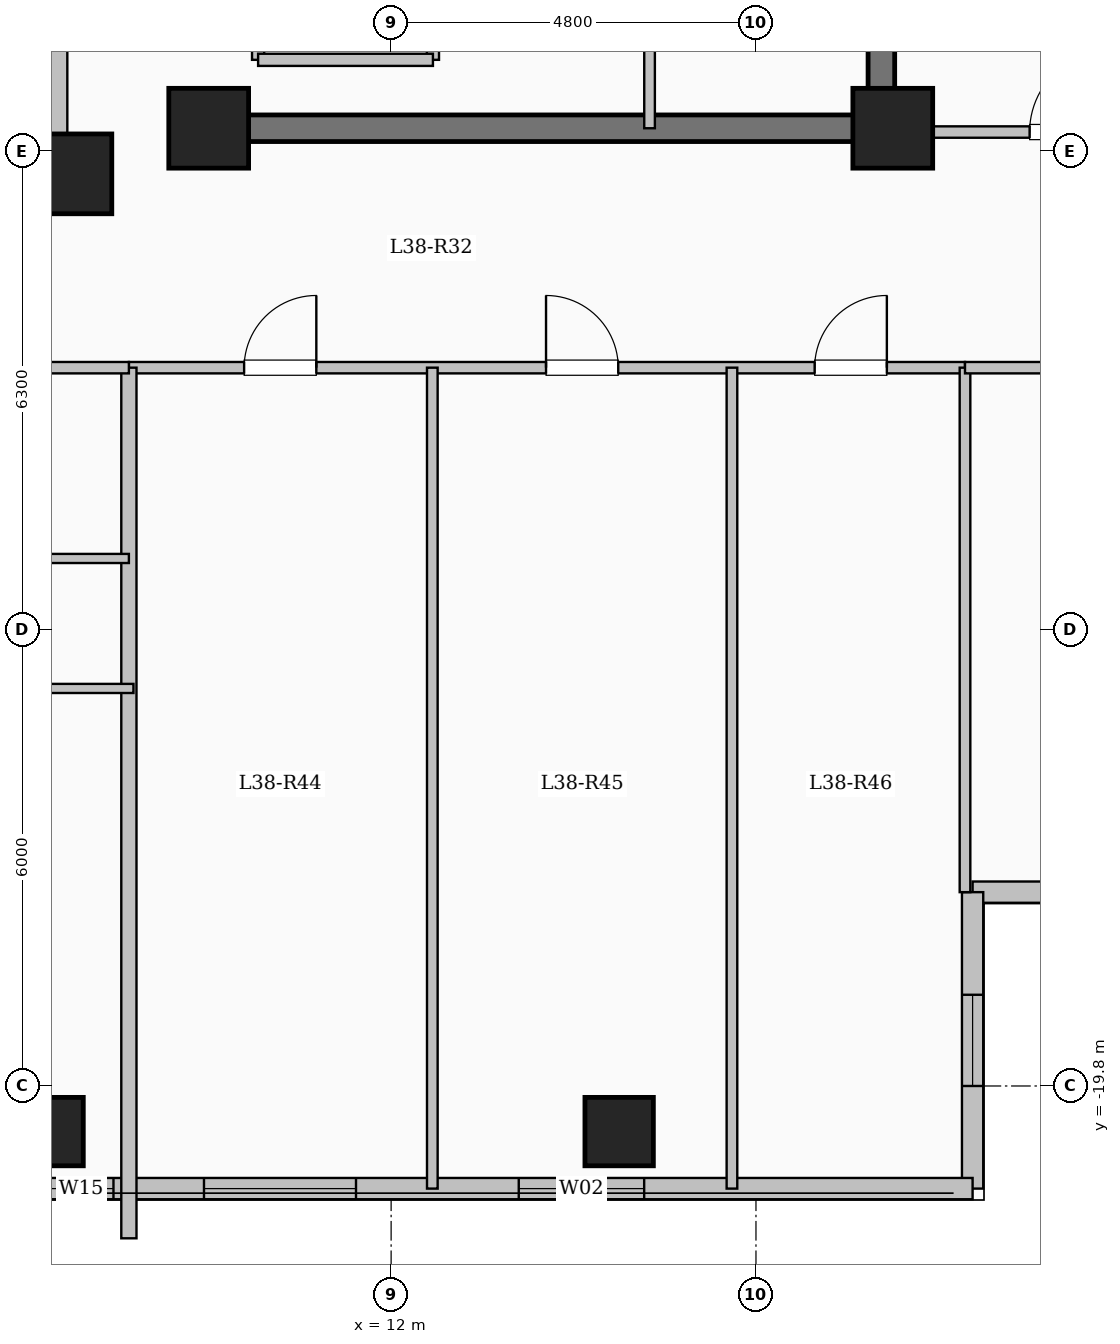
"""IFC4 building model, lengths in metres.
Left out: names, types, materials, properties, quantities, classifications, styles, units other than length and angle.
Written with IfcOpenShell. Run it as: python <this file> out.ifc"""

import sys

from ifc_helpers import new_model, si_unit, direction, frame, frame_2d, origin, origin_2d, place, context, subcontext, project, spatial, rectangle, extrude, element, fill, save


model = new_model("IFC4")
c1 = context("Model", 3, precision=1e-05, world=origin(), true_north=direction((0.0, 1.0)))
c2 = subcontext(c1, "Body", "Model", "MODEL_VIEW")
j1 = project(units=[si_unit("LENGTHUNIT", "METRE"), si_unit("PLANEANGLEUNIT", "RADIAN")], contexts=[c1])
p1 = place(None, origin())
s1 = spatial("IfcSite", under=j1, at=p1, CompositionType="ELEMENT")
p2 = place(p1, origin())
s2 = spatial("IfcBuilding", under=s1, at=p2, CompositionType="ELEMENT")
p3 = place(p2, frame((0.0, 0.0, 142.65)))
s3 = spatial("IfcBuildingStorey", under=s2, at=p3, CompositionType="ELEMENT", Elevation=142.65)
for number, where, z_axis, x_axis in (
    (1, (7.8, -7.8, 0.0), (0.0, 0.0, 1.0), (1.0, 0.0, 0.0)),
    (2, (9.6, -7.2, 0.0), (0.0, 0.0, 1.0), (1.0, 0.0, 0.0)),
    (3, (18.6, -7.2, 0.0), (0.0, 0.0, 1.0), (1.0, 0.0, 0.0)),
):
    element("IfcColumn", number, at=place(p3, frame(where, z_axis=z_axis, x_axis=x_axis)), inside=s3, PredefinedType="COLUMN", context=c2, shape_type="SweptSolid", body=[
        extrude(rectangle(XDim=1.05, YDim=1.05, at=origin_2d()), origin(), (0.0, 0.0, 1.0), 3.35),
    ])
for number, where, z_axis, x_axis in (
    (4, (7.5, -20.4, 0.0), (0.0, 0.0, 1.0), (1.0, 0.0, 0.0)),
    (5, (15.0, -20.4, 0.0), (0.0, 0.0, 1.0), (1.0, 0.0, 0.0)),
):
    element("IfcColumn", number, at=place(p3, frame(where, z_axis=z_axis, x_axis=x_axis)), inside=s3, PredefinedType="COLUMN", context=c2, shape_type="SweptSolid", body=[
        extrude(rectangle(XDim=0.9, YDim=0.9, at=origin_2d()), origin(), (0.0, 0.0, 1.0), 3.35),
    ])
p4 = place(p3, frame((-7.62, -7.62, 0.0), z_axis=(0.0, 0.0, 1.0), x_axis=(1.0, 0.0, 0.0)))
e6 = element("IfcWall", 6, at=p4, inside=s3, PredefinedType="SOLIDWALL", context=c2, shape_type="SweptSolid", body=[
    extrude(rectangle(XDim=15.24, YDim=0.24, at=frame_2d((7.62, 0.0))), origin(), (0.0, 0.0, 1.0), 3.1),
])
p5 = place(p4, frame((6.92, 0.0, 0.95)))
e7 = element("IfcOpeningElement", 7, at=p5, cuts=e6, PredefinedType="OPENING", context=c2, shape_type="SweptSolid", body=[
    extrude(rectangle(XDim=1.4, YDim=1.5, at=frame_2d((0.7, 0.75))), frame((0.0, 0.13, 0.0), z_axis=(0.0, -1.0, 0.0), x_axis=(1.0, 0.0, 0.0)), (0.0, 0.0, 1.0), 0.26),
])
p6 = place(p3, frame((7.62, -7.62, 0.0), z_axis=(0.0, 0.0, 1.0), x_axis=(0.0, 1.0, 0.0)))
e8 = element("IfcWall", 8, at=p6, inside=s3, PredefinedType="SOLIDWALL", context=c2, shape_type="SweptSolid", body=[
    extrude(rectangle(XDim=15.24, YDim=0.24, at=frame_2d((7.62, 0.0))), origin(), (0.0, 0.0, 1.0), 3.1),
])
p7 = place(p6, frame((6.92, 0.0, 0.95)))
e9 = element("IfcOpeningElement", 9, at=p7, cuts=e8, PredefinedType="OPENING", context=c2, shape_type="SweptSolid", body=[
    extrude(rectangle(XDim=1.4, YDim=1.5, at=frame_2d((0.7, 0.75))), frame((0.0, 0.13, 0.0), z_axis=(0.0, -1.0, 0.0), x_axis=(1.0, 0.0, 0.0)), (0.0, 0.0, 1.0), 0.26),
])
p8 = place(p3, frame((25.05, -17.25, 0.0), z_axis=(0.0, 0.0, 1.0), x_axis=(-1.0, 0.0, 0.0)))
e10 = element("IfcWall", 10, at=p8, inside=s3, PredefinedType="SOLIDWALL", context=c2, shape_type="SweptSolid", body=[
    extrude(rectangle(XDim=5.4, YDim=0.28, at=frame_2d((2.7, 0.0))), origin(), (0.0, 0.0, 1.0), 3.1),
])
p9 = place(p8, frame((1.625, 0.0, 0.9)))
e11 = element("IfcOpeningElement", 11, at=p9, cuts=e10, PredefinedType="OPENING", context=c2, shape_type="SweptSolid", body=[
    extrude(rectangle(XDim=2.2, YDim=1.75, at=frame_2d((1.1, 0.875))), frame((0.0, 0.15, 0.0), z_axis=(0.0, -1.0, 0.0), x_axis=(1.0, 0.0, 0.0)), (0.0, 0.0, 1.0), 0.3),
])
p10 = place(p3, frame((19.65, -17.25, 0.0), z_axis=(0.0, 0.0, 1.0), x_axis=(0.0, -1.0, 0.0)))
e12 = element("IfcWall", 12, at=p10, inside=s3, PredefinedType="SOLIDWALL", context=c2, shape_type="SweptSolid", body=[
    extrude(rectangle(XDim=3.9, YDim=0.28, at=frame_2d((1.95, 0.0))), origin(), (0.0, 0.0, 1.0), 3.1),
])
p11 = place(p10, frame((1.35, 0.0, 0.95)))
e13 = element("IfcOpeningElement", 13, at=p11, cuts=e12, PredefinedType="OPENING", context=c2, shape_type="SweptSolid", body=[
    extrude(rectangle(XDim=1.2, YDim=1.5, at=frame_2d((0.6, 0.75))), frame((0.0, 0.15, 0.0), z_axis=(0.0, -1.0, 0.0), x_axis=(1.0, 0.0, 0.0)), (0.0, 0.0, 1.0), 0.3),
])
p12 = place(p3, frame((19.65, -21.15, 0.0), z_axis=(0.0, 0.0, 1.0), x_axis=(-1.0, 0.0, 0.0)))
e14 = element("IfcWall", 14, at=p12, inside=s3, PredefinedType="SOLIDWALL", context=c2, shape_type="SweptSolid", body=[
    extrude(rectangle(XDim=12.3, YDim=0.28, at=frame_2d((6.15, 0.0))), origin(), (0.0, 0.0, 1.0), 3.1),
])
p13 = place(p12, frame((4.321, 0.0, 0.9)))
e15 = element("IfcOpeningElement", 15, at=p13, cuts=e14, PredefinedType="OPENING", context=c2, shape_type="SweptSolid", body=[
    extrude(rectangle(XDim=1.65, YDim=1.6, at=frame_2d((0.825, 0.8))), frame((0.0, 0.15, 0.0), z_axis=(0.0, -1.0, 0.0), x_axis=(1.0, 0.0, 0.0)), (0.0, 0.0, 1.0), 0.3),
])
p14 = place(p12, frame((8.112, 0.0, 0.9)))
e16 = element("IfcOpeningElement", 16, at=p14, cuts=e14, PredefinedType="OPENING", context=c2, shape_type="SweptSolid", body=[
    extrude(rectangle(XDim=2.0, YDim=1.7, at=frame_2d((1.0, 0.85))), frame((0.0, 0.15, 0.0), z_axis=(0.0, -1.0, 0.0), x_axis=(1.0, 0.0, 0.0)), (0.0, 0.0, 1.0), 0.3),
])
p15 = place(p12, frame((11.303, 0.0, 0.95)))
e17 = element("IfcOpeningElement", 17, at=p15, cuts=e14, PredefinedType="OPENING", context=c2, shape_type="SweptSolid", body=[
    extrude(rectangle(XDim=0.85, YDim=1.5, at=frame_2d((0.425, 0.75))), frame((0.0, 0.15, 0.0), z_axis=(0.0, -1.0, 0.0), x_axis=(1.0, 0.0, 0.0)), (0.0, 0.0, 1.0), 0.3),
])
p16 = place(p3, frame((10.25, -6.3, 0.0), z_axis=(0.0, 0.0, 1.0), x_axis=(0.0, 1.0, 0.0)))
e18 = element("IfcWall", 18, at=p16, inside=s3, PredefinedType="SOLIDWALL", context=c2, shape_type="SweptSolid", body=[
    extrude(rectangle(XDim=2.6, YDim=0.16, at=frame_2d((1.3, 0.0))), origin(), (0.0, 0.0, 1.0), 3.1),
])
p17 = place(p16, frame((0.75, 0.0, 0.0)))
e19 = element("IfcOpeningElement", 19, at=p17, cuts=e18, PredefinedType="OPENING", context=c2, shape_type="SweptSolid", body=[
    extrude(rectangle(XDim=1.1, YDim=2.15, at=frame_2d((0.55, 1.075))), frame((0.0, 0.09, 0.0), z_axis=(0.0, -1.0, 0.0), x_axis=(1.0, 0.0, 0.0)), (0.0, 0.0, 1.0), 0.18),
])
p18 = place(p3, frame((12.55, -6.3, 0.0), z_axis=(0.0, 0.0, 1.0), x_axis=(0.0, 1.0, 0.0)))
e20 = element("IfcWall", 20, at=p18, inside=s3, PredefinedType="SOLIDWALL", context=c2, shape_type="SweptSolid", body=[
    extrude(rectangle(XDim=2.6, YDim=0.16, at=frame_2d((1.3, 0.0))), origin(), (0.0, 0.0, 1.0), 3.1),
])
p19 = place(p3, frame((10.25, -6.3, 0.0), z_axis=(0.0, 0.0, 1.0), x_axis=(1.0, 0.0, 0.0)))
e21 = element("IfcWall", 21, at=p19, inside=s3, PredefinedType="SOLIDWALL", context=c2, shape_type="SweptSolid", body=[
    extrude(rectangle(XDim=2.3, YDim=0.16, at=frame_2d((1.15, 0.0))), origin(), (0.0, 0.0, 1.0), 3.1),
])
p20 = place(p3, frame((18.45, -7.375, 0.0), z_axis=(0.0, 0.0, 1.0), x_axis=(0.0, 1.0, 0.0)))
e22 = element("IfcWall", 22, at=p20, inside=s3, PredefinedType="SHEAR", context=c2, shape_type="SweptSolid", body=[
    extrude(rectangle(XDim=14.05, YDim=0.35, at=frame_2d((7.025, 0.0))), origin(), (0.0, 0.0, 1.0), 3.35),
])
p21 = place(p3, frame((10.075, -7.2, 0.0), z_axis=(0.0, 0.0, 1.0), x_axis=(1.0, 0.0, 0.0)))
e23 = element("IfcWall", 23, at=p21, inside=s3, PredefinedType="SHEAR", context=c2, shape_type="SweptSolid", body=[
    extrude(rectangle(XDim=8.55, YDim=0.35, at=frame_2d((4.275, 0.0))), origin(), (0.0, 0.0, 1.0), 3.35),
])
p22 = place(p3, frame((15.4, -7.2, 0.0), z_axis=(0.0, 0.0, 1.0), x_axis=(0.0, 1.0, 0.0)))
e24 = element("IfcWall", 24, at=p22, inside=s3, PredefinedType="PARTITIONING", context=c2, shape_type="SweptSolid", body=[
    extrude(rectangle(XDim=10.45, YDim=0.14, at=frame_2d((5.225, 0.0))), origin(), (0.0, 0.0, 1.0), 3.1),
])
p23 = place(p22, frame((9.25, 0.0, 0.0)))
e25 = element("IfcOpeningElement", 25, at=p23, cuts=e24, PredefinedType="OPENING", context=c2, shape_type="SweptSolid", body=[
    extrude(rectangle(XDim=0.9, YDim=2.08, at=frame_2d((0.45, 1.04))), frame((0.0, 0.08, 0.0), z_axis=(0.0, -1.0, 0.0), x_axis=(1.0, 0.0, 0.0)), (0.0, 0.0, 1.0), 0.16),
])
p24 = place(p3, frame((8.55, -10.35, 0.0), z_axis=(0.0, 0.0, 1.0), x_axis=(1.0, 0.0, 0.0)))
e26 = element("IfcWall", 26, at=p24, inside=s3, PredefinedType="PARTITIONING", context=c2, shape_type="SweptSolid", body=[
    extrude(rectangle(XDim=11.0, YDim=0.15, at=frame_2d((5.5, 0.0))), origin(), (0.0, 0.0, 1.0), 3.1),
])
p25 = place(p24, frame((1.516, 0.0, 0.0)))
e27 = element("IfcOpeningElement", 27, at=p25, cuts=e26, PredefinedType="OPENING", context=c2, shape_type="SweptSolid", body=[
    extrude(rectangle(XDim=0.95, YDim=2.15, at=frame_2d((0.475, 1.075))), frame((0.0, 0.085, 0.0), z_axis=(0.0, -1.0, 0.0), x_axis=(1.0, 0.0, 0.0)), (0.0, 0.0, 1.0), 0.17),
])
p26 = place(p24, frame((5.488, 0.0, 0.0)))
e28 = element("IfcOpeningElement", 28, at=p26, cuts=e26, PredefinedType="OPENING", context=c2, shape_type="SweptSolid", body=[
    extrude(rectangle(XDim=0.95, YDim=2.15, at=frame_2d((0.475, 1.075))), frame((0.0, 0.085, 0.0), z_axis=(0.0, -1.0, 0.0), x_axis=(1.0, 0.0, 0.0)), (0.0, 0.0, 1.0), 0.17),
])
p27 = place(p24, frame((9.022, 0.0, 0.0)))
e29 = element("IfcOpeningElement", 29, at=p27, cuts=e26, PredefinedType="OPENING", context=c2, shape_type="SweptSolid", body=[
    extrude(rectangle(XDim=0.95, YDim=2.15, at=frame_2d((0.475, 1.075))), frame((0.0, 0.085, 0.0), z_axis=(0.0, -1.0, 0.0), x_axis=(1.0, 0.0, 0.0)), (0.0, 0.0, 1.0), 0.17),
])
for number, where, z_axis, x_axis in (
    (30, (12.542, -21.15, 0.0), (0.0, 0.0, 1.0), (0.0, 1.0, 0.0)),
    (31, (16.484, -21.15, 0.0), (0.0, 0.0, 1.0), (0.0, 1.0, 0.0)),
):
    element("IfcWall", number, at=place(p3, frame(where, z_axis=z_axis, x_axis=x_axis)), inside=s3, PredefinedType="PARTITIONING", context=c2, shape_type="SweptSolid", body=[
        extrude(rectangle(XDim=10.8, YDim=0.14, at=frame_2d((5.4, 0.0))), origin(), (0.0, 0.0, 1.0), 3.1),
    ])
p28 = place(p3, frame((8.55, -21.804, 0.0), z_axis=(0.0, 0.0, 1.0), x_axis=(0.0, 1.0, 0.0)))
e32 = element("IfcWall", 32, at=p28, inside=s3, PredefinedType="SOLIDWALL", context=c2, shape_type="SweptSolid", body=[
    extrude(rectangle(XDim=11.454, YDim=0.2, at=frame_2d((5.727, 0.0))), origin(), (0.0, 0.0, 1.0), 3.1),
])
p29 = place(p3, frame((-8.55, -10.35, 0.0), z_axis=(0.0, 0.0, 1.0), x_axis=(1.0, 0.0, 0.0)))
e33 = element("IfcWall", 33, at=p29, inside=s3, PredefinedType="PARTITIONING", context=c2, shape_type="SweptSolid", body=[
    extrude(rectangle(XDim=17.1, YDim=0.15, at=frame_2d((8.55, 0.0))), origin(), (0.0, 0.0, 1.0), 3.1),
])
p30 = place(p29, frame((1.6, 0.0, 0.0)))
e34 = element("IfcOpeningElement", 34, at=p30, cuts=e33, PredefinedType="OPENING", context=c2, shape_type="SweptSolid", body=[
    extrude(rectangle(XDim=0.96, YDim=2.15, at=frame_2d((0.48, 1.075))), frame((0.0, 0.085, 0.0), z_axis=(0.0, -1.0, 0.0), x_axis=(1.0, 0.0, 0.0)), (0.0, 0.0, 1.0), 0.17),
])
p31 = place(p3, frame((4.097, -12.86, 0.0), z_axis=(0.0, 0.0, 1.0), x_axis=(1.0, 0.0, 0.0)))
e35 = element("IfcWall", 35, at=p31, inside=s3, PredefinedType="PARTITIONING", context=c2, shape_type="SweptSolid", body=[
    extrude(rectangle(XDim=4.453, YDim=0.12, at=frame_2d((2.227, 0.0))), origin(), (0.0, 0.0, 1.0), 3.1),
])
p32 = place(p31, frame((1.787, 0.0, 0.0)))
e36 = element("IfcOpeningElement", 36, at=p32, cuts=e35, PredefinedType="OPENING", context=c2, shape_type="SweptSolid", body=[
    extrude(rectangle(XDim=0.88, YDim=2.1, at=frame_2d((0.44, 1.05))), frame((0.0, 0.07, 0.0), z_axis=(0.0, -1.0, 0.0), x_axis=(1.0, 0.0, 0.0)), (0.0, 0.0, 1.0), 0.14),
])
p33 = place(p3, frame((-0.905, -14.57, 0.0), z_axis=(0.0, 0.0, 1.0), x_axis=(1.0, 0.0, 0.0)))
e37 = element("IfcWall", 37, at=p33, inside=s3, PredefinedType="PARTITIONING", context=c2, shape_type="SweptSolid", body=[
    extrude(rectangle(XDim=9.515, YDim=0.12, at=frame_2d((4.758, 0.0))), origin(), (0.0, 0.0, 1.0), 3.1),
])
p34 = place(p33, frame((1.891, 0.0, 0.0)))
e38 = element("IfcOpeningElement", 38, at=p34, cuts=e37, PredefinedType="OPENING", context=c2, shape_type="SweptSolid", body=[
    extrude(rectangle(XDim=0.88, YDim=2.1, at=frame_2d((0.44, 1.05))), frame((0.0, 0.07, 0.0), z_axis=(0.0, -1.0, 0.0), x_axis=(1.0, 0.0, 0.0)), (0.0, 0.0, 1.0), 0.14),
])
p35 = place(p33, frame((6.554, 0.0, 0.0)))
e39 = element("IfcOpeningElement", 39, at=p35, cuts=e37, PredefinedType="OPENING", context=c2, shape_type="SweptSolid", body=[
    extrude(rectangle(XDim=0.88, YDim=2.1, at=frame_2d((0.44, 1.05))), frame((0.0, 0.07, 0.0), z_axis=(0.0, -1.0, 0.0), x_axis=(1.0, 0.0, 0.0)), (0.0, 0.0, 1.0), 0.14),
])
p36 = place(p3, frame((18.45, -7.25, 0.0), z_axis=(0.0, 0.0, 1.0), x_axis=(1.0, 0.0, 0.0)))
e40 = element("IfcWall", 40, at=p36, inside=s3, PredefinedType="PARTITIONING", context=c2, shape_type="SweptSolid", body=[
    extrude(rectangle(XDim=6.63, YDim=0.15, at=frame_2d((3.315, 0.0))), origin(), (0.0, 0.0, 1.0), 3.1),
])
p37 = place(p36, frame((1.95, 0.0, 0.0)))
e41 = element("IfcOpeningElement", 41, at=p37, cuts=e40, PredefinedType="OPENING", context=c2, shape_type="SweptSolid", body=[
    extrude(rectangle(XDim=1.08, YDim=2.15, at=frame_2d((0.54, 1.075))), frame((0.0, 0.085, 0.0), z_axis=(0.0, -1.0, 0.0), x_axis=(1.0, 0.0, 0.0)), (0.0, 0.0, 1.0), 0.17),
])
p38 = place(p3, frame((19.55, -17.25, 0.0), z_axis=(0.0, 0.0, 1.0), x_axis=(0.0, 1.0, 0.0)))
e42 = element("IfcWall", 42, at=p38, inside=s3, PredefinedType="PARTITIONING", context=c2, shape_type="SweptSolid", body=[
    extrude(rectangle(XDim=6.9, YDim=0.14, at=frame_2d((3.45, 0.0))), origin(), (0.0, 0.0, 1.0), 3.1),
])
p39 = place(p3, frame((19.55, -10.35, 0.0), z_axis=(0.0, 0.0, 1.0), x_axis=(1.0, 0.0, 0.0)))
e43 = element("IfcWall", 43, at=p39, inside=s3, PredefinedType="PARTITIONING", context=c2, shape_type="SweptSolid", body=[
    extrude(rectangle(XDim=5.53, YDim=0.15, at=frame_2d((2.765, 0.0))), origin(), (0.0, 0.0, 1.0), 3.1),
])
p40 = place(p39, frame((2.29, 0.0, 0.0)))
e44 = element("IfcOpeningElement", 44, at=p40, cuts=e43, PredefinedType="OPENING", context=c2, shape_type="SweptSolid", body=[
    extrude(rectangle(XDim=0.95, YDim=2.15, at=frame_2d((0.475, 1.075))), frame((0.0, 0.085, 0.0), z_axis=(0.0, -1.0, 0.0), x_axis=(1.0, 0.0, 0.0)), (0.0, 0.0, 1.0), 0.17),
])
p41 = place(p11, origin())
e45 = element("IfcWindow", 45, at=p41, inside=s3, PartitioningType="SINGLE_PANEL", PredefinedType="WINDOW", context=c2, shape_type="SweptSolid", body=[
    extrude(rectangle(XDim=1.2, YDim=1.5, at=frame_2d((0.6, 0.75))), frame((0.0, 0.03, 0.0), z_axis=(0.0, -1.0, 0.0), x_axis=(1.0, 0.0, 0.0)), (0.0, 0.0, 1.0), 0.06),
])
fill(e13, e45)
p42 = place(p13, origin())
e46 = element("IfcWindow", 46, at=p42, inside=s3, PartitioningType="SINGLE_PANEL", PredefinedType="WINDOW", context=c2, shape_type="SweptSolid", body=[
    extrude(rectangle(XDim=1.65, YDim=1.6, at=frame_2d((0.825, 0.8))), frame((0.0, 0.03, 0.0), z_axis=(0.0, -1.0, 0.0), x_axis=(1.0, 0.0, 0.0)), (0.0, 0.0, 1.0), 0.06),
])
fill(e15, e46)
p43 = place(p14, origin())
e47 = element("IfcWindow", 47, at=p43, inside=s3, PartitioningType="SINGLE_PANEL", PredefinedType="WINDOW", context=c2, shape_type="SweptSolid", body=[
    extrude(rectangle(XDim=2.0, YDim=1.7, at=frame_2d((1.0, 0.85))), frame((0.0, 0.03, 0.0), z_axis=(0.0, -1.0, 0.0), x_axis=(1.0, 0.0, 0.0)), (0.0, 0.0, 1.0), 0.06),
])
fill(e16, e47)
p44 = place(p15, origin())
e48 = element("IfcWindow", 48, at=p44, inside=s3, PartitioningType="SINGLE_PANEL", PredefinedType="WINDOW", context=c2, shape_type="SweptSolid", body=[
    extrude(rectangle(XDim=0.85, YDim=1.5, at=frame_2d((0.425, 0.75))), frame((0.0, 0.03, 0.0), z_axis=(0.0, -1.0, 0.0), x_axis=(1.0, 0.0, 0.0)), (0.0, 0.0, 1.0), 0.06),
])
fill(e17, e48)
p45 = place(p25, origin())
e49 = element("IfcDoor", 49, at=p45, inside=s3, OperationType="SINGLE_SWING_RIGHT", PredefinedType="DOOR", context=c2, shape_type="SweptSolid", body=[
    extrude(rectangle(XDim=0.95, YDim=2.15, at=frame_2d((0.475, 1.075))), frame((0.0, 0.025, 0.0), z_axis=(0.0, -1.0, 0.0), x_axis=(1.0, 0.0, 0.0)), (0.0, 0.0, 1.0), 0.05),
])
fill(e27, e49)
p46 = place(p26, origin())
e50 = element("IfcDoor", 50, at=p46, inside=s3, OperationType="SINGLE_SWING_LEFT", PredefinedType="DOOR", context=c2, shape_type="SweptSolid", body=[
    extrude(rectangle(XDim=0.95, YDim=2.15, at=frame_2d((0.475, 1.075))), frame((0.0, 0.025, 0.0), z_axis=(0.0, -1.0, 0.0), x_axis=(1.0, 0.0, 0.0)), (0.0, 0.0, 1.0), 0.05),
])
fill(e28, e50)
p47 = place(p27, origin())
e51 = element("IfcDoor", 51, at=p47, inside=s3, OperationType="SINGLE_SWING_RIGHT", PredefinedType="DOOR", context=c2, shape_type="SweptSolid", body=[
    extrude(rectangle(XDim=0.95, YDim=2.15, at=frame_2d((0.475, 1.075))), frame((0.0, 0.025, 0.0), z_axis=(0.0, -1.0, 0.0), x_axis=(1.0, 0.0, 0.0)), (0.0, 0.0, 1.0), 0.05),
])
fill(e29, e51)
p48 = place(p37, origin())
e52 = element("IfcDoor", 52, at=p48, inside=s3, OperationType="SINGLE_SWING_RIGHT", PredefinedType="DOOR", context=c2, shape_type="SweptSolid", body=[
    extrude(rectangle(XDim=1.08, YDim=2.15, at=frame_2d((0.54, 1.075))), frame((0.0, 0.025, 0.0), z_axis=(0.0, -1.0, 0.0), x_axis=(1.0, 0.0, 0.0)), (0.0, 0.0, 1.0), 0.05),
])
fill(e41, e52)
save(model, sys.argv[1])
